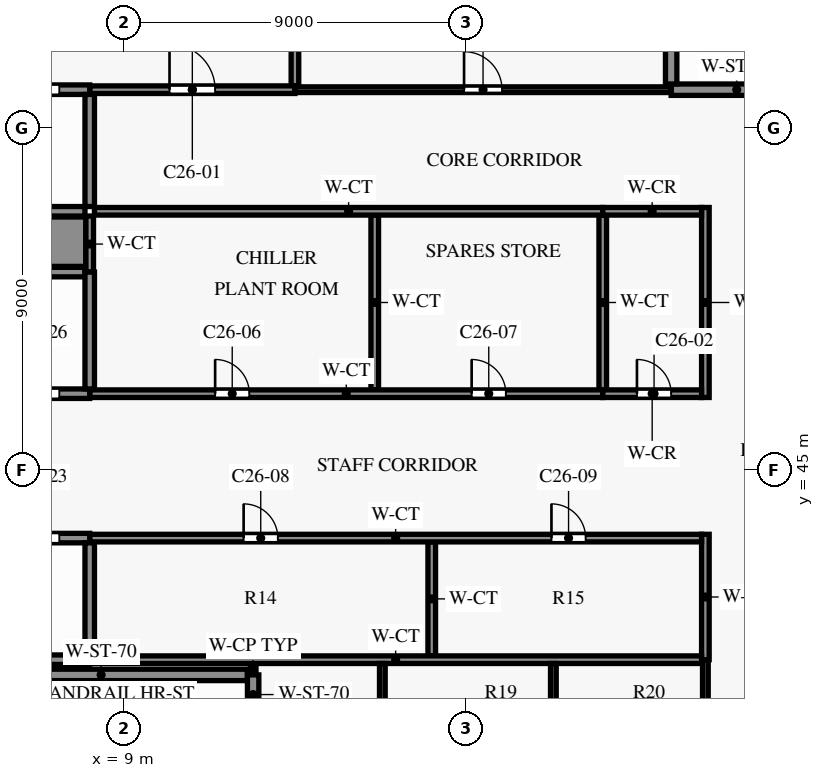
"""IFC4 building model, lengths in metres.
Left out: names, types, materials, properties, quantities, classifications, styles, units other than length and angle.
Written with IfcOpenShell. Run it as: python <this file> out.ifc"""

import sys

from ifc_helpers import new_model, si_unit, direction, frame, frame_2d, origin, place, context, subcontext, project, spatial, rectangle, extrude, element, fill, save


model = new_model("IFC4")
c1 = context("Model", 3, precision=1e-05, world=origin(), true_north=direction((0.0, 1.0)))
c2 = subcontext(c1, "Body", "Model", "MODEL_VIEW")
j1 = project(units=[si_unit("LENGTHUNIT", "METRE"), si_unit("PLANEANGLEUNIT", "RADIAN")], contexts=[c1])
p1 = place(None, origin())
s1 = spatial("IfcSite", under=j1, at=p1, CompositionType="ELEMENT")
p2 = place(p1, origin())
s2 = spatial("IfcBuilding", under=s1, at=p2, CompositionType="ELEMENT")
p3 = place(p2, frame((0.0, 0.0, 192.8)))
s3 = spatial("IfcBuildingStorey", under=s2, at=p3, CompositionType="ELEMENT", Elevation=192.8)
p4 = place(p3, frame((4.55, 39.6, 0.0), z_axis=(0.0, 0.0, 1.0), x_axis=(1.0, 0.0, 0.0)))
e1 = element("IfcWall", 1, at=p4, inside=s3, PredefinedType="SHEAR", context=c2, shape_type="SweptSolid", body=[
    extrude(rectangle(XDim=7.7, YDim=0.3, at=frame_2d((3.85, 0.0))), origin(), (0.0, 0.0, 1.0), 5.7),
])
p5 = place(p3, frame((8.1, 40.0, 0.0), z_axis=(0.0, 0.0, 1.0), x_axis=(1.0, 0.0, 0.0)))
e2 = element("IfcWall", 2, at=p5, inside=s3, PredefinedType="PARTITIONING", context=c2, shape_type="SweptSolid", body=[
    extrude(rectangle(XDim=16.1, YDim=0.2, at=frame_2d((8.05, 0.0))), origin(), (0.0, 0.0, 1.0), 5.7),
])
p6 = place(p3, frame((0.125, 40.0, 0.0), z_axis=(0.0, 0.0, 1.0), x_axis=(1.0, 0.0, 0.0)))
e3 = element("IfcWall", 3, at=p6, inside=s3, PredefinedType="SHEAR", context=c2, shape_type="SweptSolid", body=[
    extrude(rectangle(XDim=7.975, YDim=0.25, at=frame_2d((3.988, 0.0))), origin(), (0.0, 0.0, 1.0), 5.7),
])
p7 = place(p3, frame((8.1, 43.2, 0.0), z_axis=(0.0, 0.0, 1.0), x_axis=(1.0, 0.0, 0.0)))
e4 = element("IfcWall", 4, at=p7, inside=s3, PredefinedType="PARTITIONING", context=c2, shape_type="SweptSolid", body=[
    extrude(rectangle(XDim=16.1, YDim=0.2, at=frame_2d((8.05, 0.0))), origin(), (0.0, 0.0, 1.0), 5.7),
])
p8 = place(p7, frame((4.05, 0.0, 0.0)))
e5 = element("IfcOpeningElement", 5, at=p8, cuts=e4, PredefinedType="OPENING", context=c2, shape_type="SweptSolid", body=[
    extrude(rectangle(XDim=0.9, YDim=2.1, at=frame_2d((0.45, 1.05))), frame((0.0, 0.11, 0.0), z_axis=(0.0, -1.0, 0.0), x_axis=(1.0, 0.0, 0.0)), (0.0, 0.0, 1.0), 0.22),
])
p9 = place(p7, frame((12.15, 0.0, 0.0)))
e6 = element("IfcOpeningElement", 6, at=p9, cuts=e4, PredefinedType="OPENING", context=c2, shape_type="SweptSolid", body=[
    extrude(rectangle(XDim=0.9, YDim=2.1, at=frame_2d((0.45, 1.05))), frame((0.0, 0.11, 0.0), z_axis=(0.0, -1.0, 0.0), x_axis=(1.0, 0.0, 0.0)), (0.0, 0.0, 1.0), 0.22),
])
p10 = place(p3, frame((0.125, 43.2, 0.0), z_axis=(0.0, 0.0, 1.0), x_axis=(1.0, 0.0, 0.0)))
e7 = element("IfcWall", 7, at=p10, inside=s3, PredefinedType="SHEAR", context=c2, shape_type="SweptSolid", body=[
    extrude(rectangle(XDim=7.975, YDim=0.25, at=frame_2d((3.988, 0.0))), origin(), (0.0, 0.0, 1.0), 5.7),
])
p11 = place(p10, frame((0.675, 0.0, 0.0)))
e8 = element("IfcOpeningElement", 8, at=p11, cuts=e7, PredefinedType="OPENING", context=c2, shape_type="SweptSolid", body=[
    extrude(rectangle(XDim=1.1, YDim=2.1, at=frame_2d((0.55, 1.05))), frame((0.0, 0.135, 0.0), z_axis=(0.0, -1.0, 0.0), x_axis=(1.0, 0.0, 0.0)), (0.0, 0.0, 1.0), 0.27),
])
p12 = place(p10, frame((3.375, 0.0, 0.0)))
e9 = element("IfcOpeningElement", 9, at=p12, cuts=e7, PredefinedType="OPENING", context=c2, shape_type="SweptSolid", body=[
    extrude(rectangle(XDim=1.1, YDim=2.1, at=frame_2d((0.55, 1.05))), frame((0.0, 0.135, 0.0), z_axis=(0.0, -1.0, 0.0), x_axis=(1.0, 0.0, 0.0)), (0.0, 0.0, 1.0), 0.27),
])
p13 = place(p10, frame((6.075, 0.0, 0.0)))
e10 = element("IfcOpeningElement", 10, at=p13, cuts=e7, PredefinedType="OPENING", context=c2, shape_type="SweptSolid", body=[
    extrude(rectangle(XDim=1.1, YDim=2.1, at=frame_2d((0.55, 1.05))), frame((0.0, 0.135, 0.0), z_axis=(0.0, -1.0, 0.0), x_axis=(1.0, 0.0, 0.0)), (0.0, 0.0, 1.0), 0.27),
])
p14 = place(p3, frame((8.1, 47.0, 0.0), z_axis=(0.0, 0.0, 1.0), x_axis=(1.0, 0.0, 0.0)))
e11 = element("IfcWall", 11, at=p14, inside=s3, PredefinedType="PARTITIONING", context=c2, shape_type="SweptSolid", body=[
    extrude(rectangle(XDim=13.5, YDim=0.2, at=frame_2d((6.75, 0.0))), origin(), (0.0, 0.0, 1.0), 5.7),
])
p15 = place(p14, frame((3.3, 0.0, 0.0)))
e12 = element("IfcOpeningElement", 12, at=p15, cuts=e11, PredefinedType="OPENING", context=c2, shape_type="SweptSolid", body=[
    extrude(rectangle(XDim=0.9, YDim=2.1, at=frame_2d((0.45, 1.05))), frame((0.0, 0.11, 0.0), z_axis=(0.0, -1.0, 0.0), x_axis=(1.0, 0.0, 0.0)), (0.0, 0.0, 1.0), 0.22),
])
p16 = place(p14, frame((10.05, 0.0, 0.0)))
e13 = element("IfcOpeningElement", 13, at=p16, cuts=e11, PredefinedType="OPENING", context=c2, shape_type="SweptSolid", body=[
    extrude(rectangle(XDim=0.9, YDim=2.1, at=frame_2d((0.45, 1.05))), frame((0.0, 0.11, 0.0), z_axis=(0.0, -1.0, 0.0), x_axis=(1.0, 0.0, 0.0)), (0.0, 0.0, 1.0), 0.22),
])
p17 = place(p3, frame((21.6, 47.0, 0.0), z_axis=(0.0, 0.0, 1.0), x_axis=(1.0, 0.0, 0.0)))
e14 = element("IfcWall", 14, at=p17, inside=s3, PredefinedType="PARTITIONING", context=c2, shape_type="SweptSolid", body=[
    extrude(rectangle(XDim=2.6, YDim=0.2, at=frame_2d((1.3, 0.0))), origin(), (0.0, 0.0, 1.0), 5.7),
])
p18 = place(p17, frame((0.9, 0.0, 0.0)))
e15 = element("IfcOpeningElement", 15, at=p18, cuts=e14, PredefinedType="OPENING", context=c2, shape_type="SweptSolid", body=[
    extrude(rectangle(XDim=0.9, YDim=2.1, at=frame_2d((0.45, 1.05))), frame((0.0, 0.11, 0.0), z_axis=(0.0, -1.0, 0.0), x_axis=(1.0, 0.0, 0.0)), (0.0, 0.0, 1.0), 0.22),
])
p19 = place(p3, frame((0.125, 47.0, 0.0), z_axis=(0.0, 0.0, 1.0), x_axis=(1.0, 0.0, 0.0)))
e16 = element("IfcWall", 16, at=p19, inside=s3, PredefinedType="SHEAR", context=c2, shape_type="SweptSolid", body=[
    extrude(rectangle(XDim=7.975, YDim=0.25, at=frame_2d((3.988, 0.0))), origin(), (0.0, 0.0, 1.0), 5.7),
])
p20 = place(p19, frame((0.675, 0.0, 0.0)))
e17 = element("IfcOpeningElement", 17, at=p20, cuts=e16, PredefinedType="OPENING", context=c2, shape_type="SweptSolid", body=[
    extrude(rectangle(XDim=1.1, YDim=2.1, at=frame_2d((0.55, 1.05))), frame((0.0, 0.135, 0.0), z_axis=(0.0, -1.0, 0.0), x_axis=(1.0, 0.0, 0.0)), (0.0, 0.0, 1.0), 0.27),
])
p21 = place(p19, frame((3.375, 0.0, 0.0)))
e18 = element("IfcOpeningElement", 18, at=p21, cuts=e16, PredefinedType="OPENING", context=c2, shape_type="SweptSolid", body=[
    extrude(rectangle(XDim=1.1, YDim=2.1, at=frame_2d((0.55, 1.05))), frame((0.0, 0.135, 0.0), z_axis=(0.0, -1.0, 0.0), x_axis=(1.0, 0.0, 0.0)), (0.0, 0.0, 1.0), 0.27),
])
p22 = place(p19, frame((6.075, 0.0, 0.0)))
e19 = element("IfcOpeningElement", 19, at=p22, cuts=e16, PredefinedType="OPENING", context=c2, shape_type="SweptSolid", body=[
    extrude(rectangle(XDim=1.1, YDim=2.1, at=frame_2d((0.55, 1.05))), frame((0.0, 0.135, 0.0), z_axis=(0.0, -1.0, 0.0), x_axis=(1.0, 0.0, 0.0)), (0.0, 0.0, 1.0), 0.27),
])
p23 = place(p3, frame((0.125, 50.2, 0.0), z_axis=(0.0, 0.0, 1.0), x_axis=(1.0, 0.0, 0.0)))
e20 = element("IfcWall", 20, at=p23, inside=s3, PredefinedType="SHEAR", context=c2, shape_type="SweptSolid", body=[
    extrude(rectangle(XDim=7.85, YDim=0.25, at=frame_2d((3.925, 0.0))), origin(), (0.0, 0.0, 1.0), 5.7),
])
p24 = place(p3, frame((-0.125, 51.0, 0.0), z_axis=(0.0, 0.0, 1.0), x_axis=(1.0, 0.0, 0.0)))
e21 = element("IfcWall", 21, at=p24, inside=s3, PredefinedType="SHEAR", context=c2, shape_type="SweptSolid", body=[
    extrude(rectangle(XDim=8.125, YDim=1.3, at=frame_2d((4.062, 0.0))), origin(), (0.0, 0.0, 1.0), 5.7),
])
p25 = place(p3, frame((8.225, 51.8, 0.0), z_axis=(0.0, 0.0, 1.0), x_axis=(1.0, 0.0, 0.0)))
e22 = element("IfcWall", 22, at=p25, inside=s3, PredefinedType="PARTITIONING", context=c2, shape_type="SweptSolid", body=[
    extrude(rectangle(XDim=13.375, YDim=0.2, at=frame_2d((6.688, 0.0))), origin(), (0.0, 0.0, 1.0), 5.7),
])
p26 = place(p3, frame((21.6, 51.8, 0.0), z_axis=(0.0, 0.0, 1.0), x_axis=(1.0, 0.0, 0.0)))
e23 = element("IfcWall", 23, at=p26, inside=s3, PredefinedType="PARTITIONING", context=c2, shape_type="SweptSolid", body=[
    extrude(rectangle(XDim=2.6, YDim=0.2, at=frame_2d((1.3, 0.0))), origin(), (0.0, 0.0, 1.0), 5.7),
])
p27 = place(p3, frame((0.125, 51.8, 0.0), z_axis=(0.0, 0.0, 1.0), x_axis=(1.0, 0.0, 0.0)))
e24 = element("IfcWall", 24, at=p27, inside=s3, PredefinedType="SHEAR", context=c2, shape_type="SweptSolid", body=[
    extrude(rectangle(XDim=7.85, YDim=0.25, at=frame_2d((3.925, 0.0))), origin(), (0.0, 0.0, 1.0), 5.7),
])
p28 = place(p3, frame((8.1, 55.0, 0.0), z_axis=(0.0, 0.0, 1.0), x_axis=(1.0, 0.0, 0.0)))
e25 = element("IfcWall", 25, at=p28, inside=s3, PredefinedType="PARTITIONING", context=c2, shape_type="SweptSolid", body=[
    extrude(rectangle(XDim=5.4, YDim=0.2, at=frame_2d((2.7, 0.0))), origin(), (0.0, 0.0, 1.0), 5.7),
])
p29 = place(p28, frame((2.1, 0.0, 0.0)))
e26 = element("IfcOpeningElement", 26, at=p29, cuts=e25, PredefinedType="OPENING", context=c2, shape_type="SweptSolid", body=[
    extrude(rectangle(XDim=1.2, YDim=2.2, at=frame_2d((0.6, 1.1))), frame((0.0, 0.11, 0.0), z_axis=(0.0, -1.0, 0.0), x_axis=(1.0, 0.0, 0.0)), (0.0, 0.0, 1.0), 0.22),
])
p30 = place(p3, frame((13.5, 55.0, 0.0), z_axis=(0.0, 0.0, 1.0), x_axis=(1.0, 0.0, 0.0)))
e27 = element("IfcWall", 27, at=p30, inside=s3, PredefinedType="PARTITIONING", context=c2, shape_type="SweptSolid", body=[
    extrude(rectangle(XDim=9.9, YDim=0.15, at=frame_2d((4.95, 0.0))), origin(), (0.0, 0.0, 1.0), 5.7),
])
p31 = place(p30, frame((4.45, 0.0, 0.0)))
e28 = element("IfcOpeningElement", 28, at=p31, cuts=e27, PredefinedType="OPENING", context=c2, shape_type="SweptSolid", body=[
    extrude(rectangle(XDim=1.0, YDim=2.1, at=frame_2d((0.5, 1.05))), frame((0.0, 0.085, 0.0), z_axis=(0.0, -1.0, 0.0), x_axis=(1.0, 0.0, 0.0)), (0.0, 0.0, 1.0), 0.17),
])
p32 = place(p3, frame((0.15, 55.0, 0.0), z_axis=(0.0, 0.0, 1.0), x_axis=(1.0, 0.0, 0.0)))
e29 = element("IfcWall", 29, at=p32, inside=s3, PredefinedType="SHEAR", context=c2, shape_type="SweptSolid", body=[
    extrude(rectangle(XDim=7.95, YDim=0.25, at=frame_2d((3.975, 0.0))), origin(), (0.0, 0.0, 1.0), 5.7),
])
p33 = place(p32, frame((0.65, 0.0, 0.0)))
e30 = element("IfcOpeningElement", 30, at=p33, cuts=e29, PredefinedType="OPENING", context=c2, shape_type="SweptSolid", body=[
    extrude(rectangle(XDim=1.1, YDim=2.1, at=frame_2d((0.55, 1.05))), frame((0.0, 0.135, 0.0), z_axis=(0.0, -1.0, 0.0), x_axis=(1.0, 0.0, 0.0)), (0.0, 0.0, 1.0), 0.27),
])
p34 = place(p32, frame((3.35, 0.0, 0.0)))
e31 = element("IfcOpeningElement", 31, at=p34, cuts=e29, PredefinedType="OPENING", context=c2, shape_type="SweptSolid", body=[
    extrude(rectangle(XDim=1.1, YDim=2.1, at=frame_2d((0.55, 1.05))), frame((0.0, 0.135, 0.0), z_axis=(0.0, -1.0, 0.0), x_axis=(1.0, 0.0, 0.0)), (0.0, 0.0, 1.0), 0.27),
])
p35 = place(p32, frame((6.05, 0.0, 0.0)))
e32 = element("IfcOpeningElement", 32, at=p35, cuts=e29, PredefinedType="OPENING", context=c2, shape_type="SweptSolid", body=[
    extrude(rectangle(XDim=1.1, YDim=2.1, at=frame_2d((0.55, 1.05))), frame((0.0, 0.135, 0.0), z_axis=(0.0, -1.0, 0.0), x_axis=(1.0, 0.0, 0.0)), (0.0, 0.0, 1.0), 0.27),
])
p36 = place(p3, frame((23.4, 55.0, 0.0), z_axis=(0.0, 0.0, 1.0), x_axis=(1.0, 0.0, 0.0)))
e33 = element("IfcWall", 33, at=p36, inside=s3, PredefinedType="SHEAR", context=c2, shape_type="SweptSolid", body=[
    extrude(rectangle(XDim=3.45, YDim=0.3, at=frame_2d((1.725, 0.0))), origin(), (0.0, 0.0, 1.0), 5.7),
])
p37 = place(p3, frame((8.1, 50.2, 0.0), z_axis=(0.0, 0.0, 1.0), x_axis=(0.0, 1.0, 0.0)))
e34 = element("IfcWall", 34, at=p37, inside=s3, PredefinedType="PARTITIONING", context=c2, shape_type="SweptSolid", body=[
    extrude(rectangle(XDim=1.475, YDim=0.2, at=frame_2d((0.738, 0.0))), origin(), (0.0, 0.0, 1.0), 5.7),
])
p38 = place(p3, frame((8.1, 40.125, 0.0), z_axis=(0.0, 0.0, 1.0), x_axis=(0.0, 1.0, 0.0)))
e35 = element("IfcWall", 35, at=p38, inside=s3, PredefinedType="SHEAR", context=c2, shape_type="SweptSolid", body=[
    extrude(rectangle(XDim=2.95, YDim=0.25, at=frame_2d((1.475, 0.0))), origin(), (0.0, 0.0, 1.0), 5.7),
])
p39 = place(p3, frame((8.1, 47.125, 0.0), z_axis=(0.0, 0.0, 1.0), x_axis=(0.0, 1.0, 0.0)))
e36 = element("IfcWall", 36, at=p39, inside=s3, PredefinedType="SHEAR", context=c2, shape_type="SweptSolid", body=[
    extrude(rectangle(XDim=3.075, YDim=0.25, at=frame_2d((1.538, 0.0))), origin(), (0.0, 0.0, 1.0), 5.7),
])
p40 = place(p3, frame((8.1, 51.925, 0.0), z_axis=(0.0, 0.0, 1.0), x_axis=(0.0, 1.0, 0.0)))
e37 = element("IfcWall", 37, at=p40, inside=s3, PredefinedType="SHEAR", context=c2, shape_type="SweptSolid", body=[
    extrude(rectangle(XDim=2.95, YDim=0.25, at=frame_2d((1.475, 0.0))), origin(), (0.0, 0.0, 1.0), 5.7),
])
p41 = place(p3, frame((12.4, 39.6, 0.0), z_axis=(0.0, 0.0, 1.0), x_axis=(0.0, 1.0, 0.0)))
e38 = element("IfcWall", 38, at=p41, inside=s3, PredefinedType="PARTITIONING", context=c2, shape_type="SweptSolid", body=[
    extrude(rectangle(XDim=0.3, YDim=0.15, at=frame_2d((0.15, 0.0))), origin(), (0.0, 0.0, 1.0), 5.7),
])
p42 = place(p3, frame((12.4, 36.15, 0.0), z_axis=(0.0, 0.0, 1.0), x_axis=(0.0, 1.0, 0.0)))
e39 = element("IfcWall", 39, at=p42, inside=s3, PredefinedType="SHEAR", context=c2, shape_type="SweptSolid", body=[
    extrude(rectangle(XDim=3.45, YDim=0.3, at=frame_2d((1.725, 0.0))), origin(), (0.0, 0.0, 1.0), 5.7),
])
p43 = place(p3, frame((13.5, 55.1, 0.0), z_axis=(0.0, 0.0, 1.0), x_axis=(0.0, 1.0, 0.0)))
e40 = element("IfcWall", 40, at=p43, inside=s3, PredefinedType="PARTITIONING", context=c2, shape_type="SweptSolid", body=[
    extrude(rectangle(XDim=3.9, YDim=0.2, at=frame_2d((1.95, 0.0))), origin(), (0.0, 0.0, 1.0), 5.7),
])
p44 = place(p3, frame((15.6, 47.1, 0.0), z_axis=(0.0, 0.0, 1.0), x_axis=(0.0, 1.0, 0.0)))
e41 = element("IfcWall", 41, at=p44, inside=s3, PredefinedType="PARTITIONING", context=c2, shape_type="SweptSolid", body=[
    extrude(rectangle(XDim=4.6, YDim=0.2, at=frame_2d((2.3, 0.0))), origin(), (0.0, 0.0, 1.0), 5.7),
])
p45 = place(p3, frame((15.8, 36.075, 0.0), z_axis=(0.0, 0.0, 1.0), x_axis=(0.0, 1.0, 0.0)))
e42 = element("IfcWall", 42, at=p45, inside=s3, PredefinedType="PARTITIONING", context=c2, shape_type="SweptSolid", body=[
    extrude(rectangle(XDim=3.825, YDim=0.15, at=frame_2d((1.913, 0.0))), origin(), (0.0, 0.0, 1.0), 5.7),
])
p46 = place(p3, frame((17.1, 40.1, 0.0), z_axis=(0.0, 0.0, 1.0), x_axis=(0.0, 1.0, 0.0)))
e43 = element("IfcWall", 43, at=p46, inside=s3, PredefinedType="PARTITIONING", context=c2, shape_type="SweptSolid", body=[
    extrude(rectangle(XDim=3.0, YDim=0.2, at=frame_2d((1.5, 0.0))), origin(), (0.0, 0.0, 1.0), 5.7),
])
p47 = place(p3, frame((20.3, 36.075, 0.0), z_axis=(0.0, 0.0, 1.0), x_axis=(0.0, 1.0, 0.0)))
e44 = element("IfcWall", 44, at=p47, inside=s3, PredefinedType="PARTITIONING", context=c2, shape_type="SweptSolid", body=[
    extrude(rectangle(XDim=3.825, YDim=0.15, at=frame_2d((1.913, 0.0))), origin(), (0.0, 0.0, 1.0), 5.7),
])
p48 = place(p3, frame((21.6, 47.1, 0.0), z_axis=(0.0, 0.0, 1.0), x_axis=(0.0, 1.0, 0.0)))
e45 = element("IfcWall", 45, at=p48, inside=s3, PredefinedType="PARTITIONING", context=c2, shape_type="SweptSolid", body=[
    extrude(rectangle(XDim=4.6, YDim=0.2, at=frame_2d((2.3, 0.0))), origin(), (0.0, 0.0, 1.0), 5.7),
])
p49 = place(p3, frame((23.4, 55.15, 0.0), z_axis=(0.0, 0.0, 1.0), x_axis=(0.0, 1.0, 0.0)))
e46 = element("IfcWall", 46, at=p49, inside=s3, PredefinedType="SHEAR", context=c2, shape_type="SweptSolid", body=[
    extrude(rectangle(XDim=8.0, YDim=0.3, at=frame_2d((4.0, 0.0))), origin(), (0.0, 0.0, 1.0), 5.7),
])
p50 = place(p3, frame((24.3, 35.925, 0.0), z_axis=(0.0, 0.0, 1.0), x_axis=(0.0, 1.0, 0.0)))
e47 = element("IfcWall", 47, at=p50, inside=s3, PredefinedType="SHEAR", context=c2, shape_type="SweptSolid", body=[
    extrude(rectangle(XDim=4.075, YDim=0.15, at=frame_2d((2.038, 0.0))), origin(), (0.0, 0.0, 1.0), 5.7),
])
p51 = place(p3, frame((24.3, 40.0, 0.0), z_axis=(0.0, 0.0, 1.0), x_axis=(0.0, 1.0, 0.0)))
e48 = element("IfcWall", 48, at=p51, inside=s3, PredefinedType="PARTITIONING", context=c2, shape_type="SweptSolid", body=[
    extrude(rectangle(XDim=3.3, YDim=0.2, at=frame_2d((1.65, 0.0))), origin(), (0.0, 0.0, 1.0), 5.7),
])
p52 = place(p3, frame((24.3, 46.9, 0.0), z_axis=(0.0, 0.0, 1.0), x_axis=(0.0, 1.0, 0.0)))
e49 = element("IfcWall", 49, at=p52, inside=s3, PredefinedType="SHEAR", context=c2, shape_type="SweptSolid", body=[
    extrude(rectangle(XDim=5.0, YDim=0.2, at=frame_2d((2.5, 0.0))), origin(), (0.0, 0.0, 1.0), 5.7),
])
p53 = place(p29, origin())
e50 = element("IfcDoor", 50, at=p53, inside=s3, OperationType="SINGLE_SWING_RIGHT", PredefinedType="DOOR", context=c2, shape_type="SweptSolid", body=[
    extrude(rectangle(XDim=1.2, YDim=2.2, at=frame_2d((0.6, 1.1))), frame((0.0, 0.025, 0.0), z_axis=(0.0, -1.0, 0.0), x_axis=(1.0, 0.0, 0.0)), (0.0, 0.0, 1.0), 0.05),
])
fill(e26, e50)
p54 = place(p18, origin())
e51 = element("IfcDoor", 51, at=p54, inside=s3, OperationType="SINGLE_SWING_LEFT", PredefinedType="DOOR", context=c2, shape_type="SweptSolid", body=[
    extrude(rectangle(XDim=0.9, YDim=2.1, at=frame_2d((0.45, 1.05))), frame((0.0, 0.025, 0.0), z_axis=(0.0, -1.0, 0.0), x_axis=(1.0, 0.0, 0.0)), (0.0, 0.0, 1.0), 0.05),
])
fill(e15, e51)
p55 = place(p15, origin())
e52 = element("IfcDoor", 52, at=p55, inside=s3, OperationType="SINGLE_SWING_LEFT", PredefinedType="DOOR", context=c2, shape_type="SweptSolid", body=[
    extrude(rectangle(XDim=0.9, YDim=2.1, at=frame_2d((0.45, 1.05))), frame((0.0, 0.025, 0.0), z_axis=(0.0, -1.0, 0.0), x_axis=(1.0, 0.0, 0.0)), (0.0, 0.0, 1.0), 0.05),
])
fill(e12, e52)
p56 = place(p16, origin())
e53 = element("IfcDoor", 53, at=p56, inside=s3, OperationType="SINGLE_SWING_RIGHT", PredefinedType="DOOR", context=c2, shape_type="SweptSolid", body=[
    extrude(rectangle(XDim=0.9, YDim=2.1, at=frame_2d((0.45, 1.05))), frame((0.0, 0.025, 0.0), z_axis=(0.0, -1.0, 0.0), x_axis=(1.0, 0.0, 0.0)), (0.0, 0.0, 1.0), 0.05),
])
fill(e13, e53)
p57 = place(p8, origin())
e54 = element("IfcDoor", 54, at=p57, inside=s3, OperationType="SINGLE_SWING_RIGHT", PredefinedType="DOOR", context=c2, shape_type="SweptSolid", body=[
    extrude(rectangle(XDim=0.9, YDim=2.1, at=frame_2d((0.45, 1.05))), frame((0.0, 0.025, 0.0), z_axis=(0.0, -1.0, 0.0), x_axis=(1.0, 0.0, 0.0)), (0.0, 0.0, 1.0), 0.05),
])
fill(e5, e54)
p58 = place(p9, origin())
e55 = element("IfcDoor", 55, at=p58, inside=s3, OperationType="SINGLE_SWING_LEFT", PredefinedType="DOOR", context=c2, shape_type="SweptSolid", body=[
    extrude(rectangle(XDim=0.9, YDim=2.1, at=frame_2d((0.45, 1.05))), frame((0.0, 0.025, 0.0), z_axis=(0.0, -1.0, 0.0), x_axis=(1.0, 0.0, 0.0)), (0.0, 0.0, 1.0), 0.05),
])
fill(e6, e55)
p59 = place(p31, origin())
e56 = element("IfcDoor", 56, at=p59, inside=s3, OperationType="SINGLE_SWING_LEFT", PredefinedType="DOOR", context=c2, shape_type="SweptSolid", body=[
    extrude(rectangle(XDim=1.0, YDim=2.1, at=frame_2d((0.5, 1.05))), frame((0.0, 0.025, 0.0), z_axis=(0.0, -1.0, 0.0), x_axis=(1.0, 0.0, 0.0)), (0.0, 0.0, 1.0), 0.05),
])
fill(e28, e56)
p60 = place(p35, origin())
e57 = element("IfcDoor", 57, at=p60, inside=s3, OperationType="DOUBLE_DOOR_SLIDING", PredefinedType="DOOR", context=c2, shape_type="SweptSolid", body=[
    extrude(rectangle(XDim=1.1, YDim=2.1, at=frame_2d((0.55, 1.05))), frame((0.0, 0.025, 0.0), z_axis=(0.0, -1.0, 0.0), x_axis=(1.0, 0.0, 0.0)), (0.0, 0.0, 1.0), 0.05),
])
fill(e32, e57)
p61 = place(p13, origin())
e58 = element("IfcDoor", 58, at=p61, inside=s3, OperationType="DOUBLE_DOOR_SLIDING", PredefinedType="DOOR", context=c2, shape_type="SweptSolid", body=[
    extrude(rectangle(XDim=1.1, YDim=2.1, at=frame_2d((0.55, 1.05))), frame((0.0, 0.025, 0.0), z_axis=(0.0, -1.0, 0.0), x_axis=(1.0, 0.0, 0.0)), (0.0, 0.0, 1.0), 0.05),
])
fill(e10, e58)
p62 = place(p22, origin())
e59 = element("IfcDoor", 59, at=p62, inside=s3, OperationType="DOUBLE_DOOR_SLIDING", PredefinedType="DOOR", context=c2, shape_type="SweptSolid", body=[
    extrude(rectangle(XDim=1.1, YDim=2.1, at=frame_2d((0.55, 1.05))), frame((0.0, 0.025, 0.0), z_axis=(0.0, -1.0, 0.0), x_axis=(1.0, 0.0, 0.0)), (0.0, 0.0, 1.0), 0.05),
])
fill(e19, e59)
save(model, sys.argv[1])
